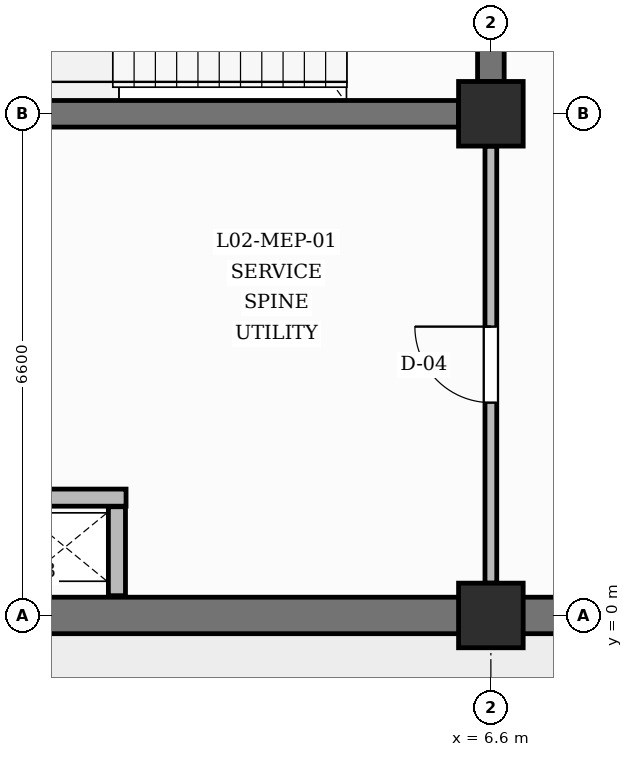
"""IFC4 building model, lengths in metres.
Left out: names, types, materials, properties, quantities, classifications, styles, units other than length and angle.
Written with IfcOpenShell. Run it as: python <this file> out.ifc"""

import sys

from ifc_helpers import new_model, si_unit, direction, frame, frame_2d, origin, origin_2d, place, context, subcontext, project, spatial, rectangle, extrude, element, fill, save


model = new_model("IFC4")
c1 = context("Model", 3, precision=1e-05, world=origin(), true_north=direction((0.0, 1.0)))
c2 = subcontext(c1, "Body", "Model", "MODEL_VIEW")
j1 = project(units=[si_unit("LENGTHUNIT", "METRE"), si_unit("PLANEANGLEUNIT", "RADIAN")], contexts=[c1])
p1 = place(None, origin())
s1 = spatial("IfcSite", under=j1, at=p1, CompositionType="ELEMENT")
p2 = place(p1, origin())
s2 = spatial("IfcBuilding", under=s1, at=p2, CompositionType="ELEMENT")
p3 = place(p2, frame((0.0, 0.0, 10.2)))
s3 = spatial("IfcBuildingStorey", under=s2, at=p3, CompositionType="ELEMENT", Elevation=10.2)
for number, where, z_axis, x_axis in (
    (1, (6.6, 0.0, 0.0), (0.0, 0.0, 1.0), (1.0, 0.0, 0.0)),
    (2, (6.6, 6.6, 0.0), (0.0, 0.0, 1.0), (1.0, 0.0, 0.0)),
):
    element("IfcColumn", number, at=place(p3, frame(where, z_axis=z_axis, x_axis=x_axis)), inside=s3, PredefinedType="COLUMN", context=c2, shape_type="SweptSolid", body=[
        extrude(rectangle(XDim=0.85, YDim=0.85, at=origin_2d()), origin(), (0.0, 0.0, 1.0), 4.2),
    ])
for number, where, z_axis, x_axis in (
    (3, (0.425, 0.0, 0.0), (0.0, 0.0, 1.0), (1.0, 0.0, 0.0)),
    (4, (7.025, 0.0, 0.0), (0.0, 0.0, 1.0), (1.0, 0.0, 0.0)),
):
    element("IfcWall", number, at=place(p3, frame(where, z_axis=z_axis, x_axis=x_axis)), inside=s3, PredefinedType="SOLIDWALL", context=c2, shape_type="SweptSolid", body=[
        extrude(rectangle(XDim=5.75, YDim=0.48, at=frame_2d((2.875, 0.0))), origin(), (0.0, 0.0, 1.0), 3.25),
    ])
p4 = place(p3, frame((0.425, 6.6, 0.0), z_axis=(0.0, 0.0, 1.0), x_axis=(1.0, 0.0, 0.0)))
e5 = element("IfcWall", 5, at=p4, inside=s3, PredefinedType="SHEAR", context=c2, shape_type="SweptSolid", body=[
    extrude(rectangle(XDim=5.75, YDim=0.35, at=frame_2d((2.875, 0.0))), origin(), (0.0, 0.0, 1.0), 3.1),
])
p5 = place(p3, frame((6.6, 7.025, 0.0), z_axis=(0.0, 0.0, 1.0), x_axis=(0.0, 1.0, 0.0)))
e6 = element("IfcWall", 6, at=p5, inside=s3, PredefinedType="SHEAR", context=c2, shape_type="SweptSolid", body=[
    extrude(rectangle(XDim=5.75, YDim=0.35, at=frame_2d((2.875, 0.0))), origin(), (0.0, 0.0, 1.0), 3.1),
])
p6 = place(p5, frame((2.3, 0.0, 0.0)))
e7 = element("IfcOpeningElement", 7, at=p6, cuts=e6, PredefinedType="OPENING", context=c2, shape_type="SweptSolid", body=[
    extrude(rectangle(XDim=1.15, YDim=2.2, at=frame_2d((0.575, 1.1))), frame((0.0, 0.185, 0.0), z_axis=(0.0, -1.0, 0.0), x_axis=(1.0, 0.0, 0.0)), (0.0, 0.0, 1.0), 0.37),
])
p7 = place(p3, frame((1.68, 0.26, 0.0), z_axis=(0.0, 0.0, 1.0), x_axis=(0.0, 1.0, 0.0)))
e8 = element("IfcWall", 8, at=p7, inside=s3, PredefinedType="PARTITIONING", context=c2, shape_type="SweptSolid", body=[
    extrude(rectangle(XDim=1.17, YDim=0.225, at=frame_2d((0.585, 0.0))), origin(), (0.0, 0.0, 1.0), 3.85),
])
p8 = place(p3, frame((0.26, 1.55, 0.0), z_axis=(0.0, 0.0, 1.0), x_axis=(1.0, 0.0, 0.0)))
e9 = element("IfcWall", 9, at=p8, inside=s3, PredefinedType="PARTITIONING", context=c2, shape_type="SweptSolid", body=[
    extrude(rectangle(XDim=1.54, YDim=0.225, at=frame_2d((0.77, 0.0))), origin(), (0.0, 0.0, 1.0), 3.85),
])
p9 = place(p3, frame((6.6, 0.425, 0.0), z_axis=(0.0, 0.0, 1.0), x_axis=(0.0, 1.0, 0.0)))
e10 = element("IfcWall", 10, at=p9, inside=s3, PredefinedType="PARTITIONING", context=c2, shape_type="SweptSolid", body=[
    extrude(rectangle(XDim=5.75, YDim=0.155, at=frame_2d((2.875, 0.0))), origin(), (0.0, 0.0, 1.0), 3.1),
])
p10 = place(p9, frame((2.375, 0.0, 0.0)))
e11 = element("IfcOpeningElement", 11, at=p10, cuts=e10, PredefinedType="OPENING", context=c2, shape_type="SweptSolid", body=[
    extrude(rectangle(XDim=1.0, YDim=2.1, at=frame_2d((0.5, 1.05))), frame((0.0, 0.087, 0.0), z_axis=(0.0, -1.0, 0.0), x_axis=(1.0, 0.0, 0.0)), (0.0, 0.0, 1.0), 0.175),
])
p11 = place(p10, origin())
e12 = element("IfcDoor", 12, at=p11, inside=s3, OperationType="SINGLE_SWING_RIGHT", PredefinedType="DOOR", context=c2, shape_type="SweptSolid", body=[
    extrude(rectangle(XDim=1.0, YDim=2.1, at=frame_2d((0.5, 1.05))), frame((0.0, 0.025, 0.0), z_axis=(0.0, -1.0, 0.0), x_axis=(1.0, 0.0, 0.0)), (0.0, 0.0, 1.0), 0.05),
])
fill(e11, e12)
save(model, sys.argv[1])
